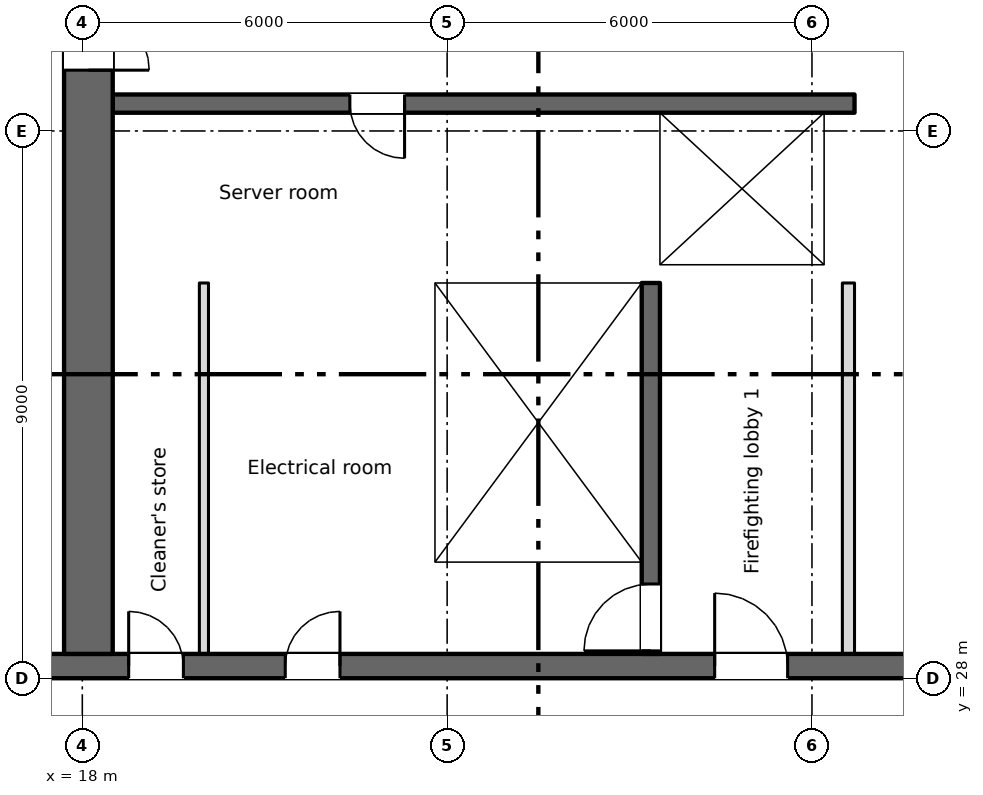
"""IFC4 building model, lengths in metres.
Left out: names, types, materials, properties, quantities, classifications, styles, units other than length and angle.
Written with IfcOpenShell. Run it as: python <this file> out.ifc"""

import sys

from ifc_helpers import new_model, si_unit, direction, frame, frame_2d, origin, place, context, subcontext, project, spatial, rectangle, extrude, element, fill, save


model = new_model("IFC4")
c1 = context("Model", 3, precision=1e-05, world=origin(), true_north=direction((0.0, 1.0)))
c2 = subcontext(c1, "Body", "Model", "MODEL_VIEW")
j1 = project(units=[si_unit("LENGTHUNIT", "METRE"), si_unit("PLANEANGLEUNIT", "RADIAN")], contexts=[c1])
p1 = place(None, origin())
s1 = spatial("IfcSite", under=j1, at=p1, CompositionType="ELEMENT")
p2 = place(p1, origin())
s2 = spatial("IfcBuilding", under=s1, at=p2, CompositionType="ELEMENT")
p3 = place(p2, frame((0.0, 0.0, 125.0)))
s3 = spatial("IfcBuildingStorey", under=s2, at=p3, CompositionType="ELEMENT", Elevation=125.0)
p4 = place(p3, frame((6.7, 28.2, 0.0), z_axis=(0.0, 0.0, 1.0), x_axis=(1.0, 0.0, 0.0)))
e1 = element("IfcWall", 1, at=p4, inside=s3, PredefinedType="SHEAR", context=c2, shape_type="SweptSolid", body=[
    extrude(rectangle(XDim=57.8, YDim=0.4, at=frame_2d((28.9, 0.0))), origin(), (0.0, 0.0, 1.0), 3.35),
])
p5 = place(p4, frame((12.062, 0.0, 0.0)))
e2 = element("IfcOpeningElement", 2, at=p5, cuts=e1, PredefinedType="OPENING", context=c2, shape_type="SweptSolid", body=[
    extrude(rectangle(XDim=0.9, YDim=2.1, at=frame_2d((0.45, 1.05))), frame((0.0, 0.21, 0.0), z_axis=(0.0, -1.0, 0.0), x_axis=(1.0, 0.0, 0.0)), (0.0, 0.0, 1.0), 0.42),
])
p6 = place(p4, frame((14.637, 0.0, 0.0)))
e3 = element("IfcOpeningElement", 3, at=p6, cuts=e1, PredefinedType="OPENING", context=c2, shape_type="SweptSolid", body=[
    extrude(rectangle(XDim=0.9, YDim=2.1, at=frame_2d((0.45, 1.05))), frame((0.0, 0.21, 0.0), z_axis=(0.0, -1.0, 0.0), x_axis=(1.0, 0.0, 0.0)), (0.0, 0.0, 1.0), 0.42),
])
p7 = place(p4, frame((49.062, 0.0, 0.0)))
e4 = element("IfcOpeningElement", 4, at=p7, cuts=e1, PredefinedType="OPENING", context=c2, shape_type="SweptSolid", body=[
    extrude(rectangle(XDim=0.9, YDim=2.1, at=frame_2d((0.45, 1.05))), frame((0.0, 0.21, 0.0), z_axis=(0.0, -1.0, 0.0), x_axis=(1.0, 0.0, 0.0)), (0.0, 0.0, 1.0), 0.42),
])
p8 = place(p4, frame((51.637, 0.0, 0.0)))
e5 = element("IfcOpeningElement", 5, at=p8, cuts=e1, PredefinedType="OPENING", context=c2, shape_type="SweptSolid", body=[
    extrude(rectangle(XDim=0.9, YDim=2.1, at=frame_2d((0.45, 1.05))), frame((0.0, 0.21, 0.0), z_axis=(0.0, -1.0, 0.0), x_axis=(1.0, 0.0, 0.0)), (0.0, 0.0, 1.0), 0.42),
])
p9 = place(p4, frame((1.35, 0.0, 0.0)))
e6 = element("IfcOpeningElement", 6, at=p9, cuts=e1, PredefinedType="OPENING", context=c2, shape_type="SweptSolid", body=[
    extrude(rectangle(XDim=0.9, YDim=2.1, at=frame_2d((0.45, 1.05))), frame((0.0, 0.21, 0.0), z_axis=(0.0, -1.0, 0.0), x_axis=(1.0, 0.0, 0.0)), (0.0, 0.0, 1.0), 0.42),
])
p10 = place(p4, frame((4.7, 0.0, 0.0)))
e7 = element("IfcOpeningElement", 7, at=p10, cuts=e1, PredefinedType="OPENING", context=c2, shape_type="SweptSolid", body=[
    extrude(rectangle(XDim=1.2, YDim=2.1, at=frame_2d((0.6, 1.05))), frame((0.0, 0.21, 0.0), z_axis=(0.0, -1.0, 0.0), x_axis=(1.0, 0.0, 0.0)), (0.0, 0.0, 1.0), 0.42),
])
p11 = place(p4, frame((31.7, 0.0, 0.0)))
e8 = element("IfcOpeningElement", 8, at=p11, cuts=e1, PredefinedType="OPENING", context=c2, shape_type="SweptSolid", body=[
    extrude(rectangle(XDim=1.2, YDim=2.1, at=frame_2d((0.6, 1.05))), frame((0.0, 0.21, 0.0), z_axis=(0.0, -1.0, 0.0), x_axis=(1.0, 0.0, 0.0)), (0.0, 0.0, 1.0), 0.42),
])
p12 = place(p4, frame((55.2, 0.0, 0.0)))
e9 = element("IfcOpeningElement", 9, at=p12, cuts=e1, PredefinedType="OPENING", context=c2, shape_type="SweptSolid", body=[
    extrude(rectangle(XDim=1.2, YDim=2.1, at=frame_2d((0.6, 1.05))), frame((0.0, 0.21, 0.0), z_axis=(0.0, -1.0, 0.0), x_axis=(1.0, 0.0, 0.0)), (0.0, 0.0, 1.0), 0.42),
])
p13 = place(p4, frame((21.7, 0.0, 0.0)))
e10 = element("IfcOpeningElement", 10, at=p13, cuts=e1, PredefinedType="OPENING", context=c2, shape_type="SweptSolid", body=[
    extrude(rectangle(XDim=1.2, YDim=2.1, at=frame_2d((0.6, 1.05))), frame((0.0, 0.21, 0.0), z_axis=(0.0, -1.0, 0.0), x_axis=(1.0, 0.0, 0.0)), (0.0, 0.0, 1.0), 0.42),
])
p14 = place(p4, frame((41.7, 0.0, 0.0)))
e11 = element("IfcOpeningElement", 11, at=p14, cuts=e1, PredefinedType="OPENING", context=c2, shape_type="SweptSolid", body=[
    extrude(rectangle(XDim=1.2, YDim=2.1, at=frame_2d((0.6, 1.05))), frame((0.0, 0.21, 0.0), z_axis=(0.0, -1.0, 0.0), x_axis=(1.0, 0.0, 0.0)), (0.0, 0.0, 1.0), 0.42),
])
p15 = place(p4, frame((24.85, 0.0, 0.0)))
e12 = element("IfcOpeningElement", 12, at=p15, cuts=e1, PredefinedType="OPENING", context=c2, shape_type="SweptSolid", body=[
    extrude(rectangle(XDim=2.4, YDim=2.1, at=frame_2d((1.2, 1.05))), frame((0.0, 0.21, 0.0), z_axis=(0.0, -1.0, 0.0), x_axis=(1.0, 0.0, 0.0)), (0.0, 0.0, 1.0), 0.42),
])
p16 = place(p4, frame((37.35, 0.0, 0.0)))
e13 = element("IfcOpeningElement", 13, at=p16, cuts=e1, PredefinedType="OPENING", context=c2, shape_type="SweptSolid", body=[
    extrude(rectangle(XDim=2.4, YDim=2.1, at=frame_2d((1.2, 1.05))), frame((0.0, 0.21, 0.0), z_axis=(0.0, -1.0, 0.0), x_axis=(1.0, 0.0, 0.0)), (0.0, 0.0, 1.0), 0.42),
])
p17 = place(p4, frame((7.95, 0.0, 0.0)))
e14 = element("IfcOpeningElement", 14, at=p17, cuts=e1, PredefinedType="OPENING", context=c2, shape_type="SweptSolid", body=[
    extrude(rectangle(XDim=2.4, YDim=2.1, at=frame_2d((1.2, 1.05))), frame((0.0, 0.21, 0.0), z_axis=(0.0, -1.0, 0.0), x_axis=(1.0, 0.0, 0.0)), (0.0, 0.0, 1.0), 0.42),
])
p18 = place(p4, frame((28.85, 0.0, 0.0)))
e15 = element("IfcOpeningElement", 15, at=p18, cuts=e1, PredefinedType="OPENING", context=c2, shape_type="SweptSolid", body=[
    extrude(rectangle(XDim=0.9, YDim=2.1, at=frame_2d((0.45, 1.05))), frame((0.0, 0.21, 0.0), z_axis=(0.0, -1.0, 0.0), x_axis=(1.0, 0.0, 0.0)), (0.0, 0.0, 1.0), 0.42),
])
p19 = place(p4, frame((34.85, 0.0, 0.0)))
e16 = element("IfcOpeningElement", 16, at=p19, cuts=e1, PredefinedType="OPENING", context=c2, shape_type="SweptSolid", body=[
    extrude(rectangle(XDim=0.9, YDim=2.1, at=frame_2d((0.45, 1.05))), frame((0.0, 0.21, 0.0), z_axis=(0.0, -1.0, 0.0), x_axis=(1.0, 0.0, 0.0)), (0.0, 0.0, 1.0), 0.42),
])
p20 = place(p3, frame((18.1, 28.4, 0.0), z_axis=(0.0, 0.0, 1.0), x_axis=(0.0, 1.0, 0.0)))
e17 = element("IfcWall", 17, at=p20, inside=s3, PredefinedType="SHEAR", context=c2, shape_type="SweptSolid", body=[
    extrude(rectangle(XDim=16.8, YDim=0.8, at=frame_2d((8.4, 0.0))), origin(), (0.0, 0.0, 1.0), 3.35),
])
p21 = place(p20, frame((9.6, 0.0, 0.0)))
e18 = element("IfcOpeningElement", 18, at=p21, cuts=e17, PredefinedType="OPENING", context=c2, shape_type="SweptSolid", body=[
    extrude(rectangle(XDim=2.0, YDim=2.1, at=frame_2d((1.0, 1.05))), frame((0.0, 0.41, 0.0), z_axis=(0.0, -1.0, 0.0), x_axis=(1.0, 0.0, 0.0)), (0.0, 0.0, 1.0), 0.82),
])
p22 = place(p20, frame((15.35, 0.0, 0.0)))
e19 = element("IfcOpeningElement", 19, at=p22, cuts=e17, PredefinedType="OPENING", context=c2, shape_type="SweptSolid", body=[
    extrude(rectangle(XDim=1.2, YDim=2.1, at=frame_2d((0.6, 1.05))), frame((0.0, 0.41, 0.0), z_axis=(0.0, -1.0, 0.0), x_axis=(1.0, 0.0, 0.0)), (0.0, 0.0, 1.0), 0.82),
])
p23 = place(p3, frame((23.65, 28.4, 0.0), z_axis=(0.0, 0.0, 1.0), x_axis=(0.0, 1.0, 0.0)))
e20 = element("IfcWall", 20, at=p23, inside=s3, PredefinedType="SHEAR", context=c2, shape_type="SweptSolid", body=[
    extrude(rectangle(XDim=6.1, YDim=0.3, at=frame_2d((3.05, 0.0))), origin(), (0.0, 0.0, 1.0), 3.35),
])
p24 = place(p3, frame((27.35, 28.4, 0.0), z_axis=(0.0, 0.0, 1.0), x_axis=(0.0, 1.0, 0.0)))
e21 = element("IfcWall", 21, at=p24, inside=s3, PredefinedType="SHEAR", context=c2, shape_type="SweptSolid", body=[
    extrude(rectangle(XDim=6.1, YDim=0.3, at=frame_2d((3.05, 0.0))), origin(), (0.0, 0.0, 1.0), 3.35),
])
p25 = place(p24, frame((0.05, 0.0, 0.0)))
e22 = element("IfcOpeningElement", 22, at=p25, cuts=e21, PredefinedType="OPENING", context=c2, shape_type="SweptSolid", body=[
    extrude(rectangle(XDim=1.1, YDim=2.1, at=frame_2d((0.55, 1.05))), frame((0.0, 0.16, 0.0), z_axis=(0.0, -1.0, 0.0), x_axis=(1.0, 0.0, 0.0)), (0.0, 0.0, 1.0), 0.32),
])
p26 = place(p3, frame((18.5, 34.65, 0.0), z_axis=(0.0, 0.0, 1.0), x_axis=(1.0, 0.0, 0.0)))
e23 = element("IfcWall", 23, at=p26, inside=s3, PredefinedType="SHEAR", context=c2, shape_type="SweptSolid", body=[
    extrude(rectangle(XDim=12.2, YDim=0.3, at=frame_2d((6.1, 0.0))), origin(), (0.0, 0.0, 1.0), 3.35),
])
p27 = place(p26, frame((9.8, 0.0, 0.0)))
e24 = element("IfcOpeningElement", 24, at=p27, cuts=e23, PredefinedType="OPENING", context=c2, shape_type="SweptSolid", body=[
    extrude(rectangle(XDim=1.1, YDim=2.1, at=frame_2d((0.55, 1.05))), frame((0.0, 0.16, 0.0), z_axis=(0.0, -1.0, 0.0), x_axis=(1.0, 0.0, 0.0)), (0.0, 0.0, 1.0), 0.32),
])
p28 = place(p3, frame((30.7, 37.45, 0.0), z_axis=(0.0, 0.0, 1.0), x_axis=(-1.0, 0.0, 0.0)))
e25 = element("IfcWall", 25, at=p28, inside=s3, PredefinedType="SHEAR", context=c2, shape_type="SweptSolid", body=[
    extrude(rectangle(XDim=12.2, YDim=0.3, at=frame_2d((6.1, 0.0))), origin(), (0.0, 0.0, 1.0), 3.35),
])
p29 = place(p28, frame((7.4, 0.0, 0.0)))
e26 = element("IfcOpeningElement", 26, at=p29, cuts=e25, PredefinedType="OPENING", context=c2, shape_type="SweptSolid", body=[
    extrude(rectangle(XDim=0.9, YDim=2.1, at=frame_2d((0.45, 1.05))), frame((0.0, 0.16, 0.0), z_axis=(0.0, -1.0, 0.0), x_axis=(1.0, 0.0, 0.0)), (0.0, 0.0, 1.0), 0.32),
])
p30 = place(p3, frame((27.35, 34.8, 0.0), z_axis=(0.0, 0.0, 1.0), x_axis=(0.0, 1.0, 0.0)))
e27 = element("IfcWall", 27, at=p30, inside=s3, PredefinedType="SHEAR", context=c2, shape_type="SweptSolid", body=[
    extrude(rectangle(XDim=2.5, YDim=0.3, at=frame_2d((1.25, 0.0))), origin(), (0.0, 0.0, 1.0), 3.35),
])
p31 = place(p3, frame((30.45, 34.8, 0.0), z_axis=(0.0, 0.0, 1.0), x_axis=(0.0, 1.0, 0.0)))
e28 = element("IfcWall", 28, at=p31, inside=s3, PredefinedType="SHEAR", context=c2, shape_type="SweptSolid", body=[
    extrude(rectangle(XDim=2.5, YDim=0.5, at=frame_2d((1.25, 0.0))), origin(), (0.0, 0.0, 1.0), 3.35),
])
p32 = place(p3, frame((30.6, 28.4, 0.0), z_axis=(0.0, 0.0, 1.0), x_axis=(0.0, 1.0, 0.0)))
e29 = element("IfcWall", 29, at=p32, inside=s3, PredefinedType="PARTITIONING", context=c2, shape_type="SweptSolid", body=[
    extrude(rectangle(XDim=6.1, YDim=0.2, at=frame_2d((3.05, 0.0))), origin(), (0.0, 0.0, 1.0), 3.35),
])
p33 = place(p3, frame((20.0, 28.4, 0.0), z_axis=(0.0, 0.0, 1.0), x_axis=(0.0, 1.0, 0.0)))
e30 = element("IfcWall", 30, at=p33, inside=s3, PredefinedType="PARTITIONING", context=c2, shape_type="SweptSolid", body=[
    extrude(rectangle(XDim=6.1, YDim=0.15, at=frame_2d((3.05, 0.0))), origin(), (0.0, 0.0, 1.0), 3.35),
])
p34 = place(p5, origin())
e31 = element("IfcDoor", 31, at=p34, inside=s3, OperationType="SINGLE_SWING_LEFT", PredefinedType="DOOR", context=c2, shape_type="SweptSolid", body=[
    extrude(rectangle(XDim=0.9, YDim=2.1, at=frame_2d((0.45, 1.05))), frame((0.0, 0.025, 0.0), z_axis=(0.0, -1.0, 0.0), x_axis=(1.0, 0.0, 0.0)), (0.0, 0.0, 1.0), 0.05),
])
fill(e2, e31)
p35 = place(p6, origin())
e32 = element("IfcDoor", 32, at=p35, inside=s3, OperationType="SINGLE_SWING_RIGHT", PredefinedType="DOOR", context=c2, shape_type="SweptSolid", body=[
    extrude(rectangle(XDim=0.9, YDim=2.1, at=frame_2d((0.45, 1.05))), frame((0.0, 0.025, 0.0), z_axis=(0.0, -1.0, 0.0), x_axis=(1.0, 0.0, 0.0)), (0.0, 0.0, 1.0), 0.05),
])
fill(e3, e32)
p36 = place(p29, origin())
e33 = element("IfcDoor", 33, at=p36, inside=s3, OperationType="SINGLE_SWING_LEFT", PredefinedType="DOOR", context=c2, shape_type="SweptSolid", body=[
    extrude(rectangle(XDim=0.9, YDim=2.1, at=frame_2d((0.45, 1.05))), frame((0.0, 0.025, 0.0), z_axis=(0.0, -1.0, 0.0), x_axis=(1.0, 0.0, 0.0)), (0.0, 0.0, 1.0), 0.05),
])
fill(e26, e33)
p37 = place(p27, origin())
e34 = element("IfcDoor", 34, at=p37, inside=s3, OperationType="SLIDING_TO_LEFT", PredefinedType="DOOR", context=c2, shape_type="SweptSolid", body=[
    extrude(rectangle(XDim=1.1, YDim=2.1, at=frame_2d((0.55, 1.05))), frame((0.0, 0.025, 0.0), z_axis=(0.0, -1.0, 0.0), x_axis=(1.0, 0.0, 0.0)), (0.0, 0.0, 1.0), 0.05),
])
fill(e24, e34)
p38 = place(p25, origin())
e35 = element("IfcDoor", 35, at=p38, inside=s3, OperationType="SINGLE_SWING_LEFT", PredefinedType="DOOR", context=c2, shape_type="SweptSolid", body=[
    extrude(rectangle(XDim=1.1, YDim=2.1, at=frame_2d((0.55, 1.05))), frame((0.0, 0.025, 0.0), z_axis=(0.0, -1.0, 0.0), x_axis=(1.0, 0.0, 0.0)), (0.0, 0.0, 1.0), 0.05),
])
fill(e22, e35)
p39 = place(p13, origin())
e36 = element("IfcDoor", 36, at=p39, inside=s3, OperationType="SINGLE_SWING_LEFT", PredefinedType="DOOR", context=c2, shape_type="SweptSolid", body=[
    extrude(rectangle(XDim=1.2, YDim=2.1, at=frame_2d((0.6, 1.05))), frame((0.0, 0.025, 0.0), z_axis=(0.0, -1.0, 0.0), x_axis=(1.0, 0.0, 0.0)), (0.0, 0.0, 1.0), 0.05),
])
fill(e10, e36)
p40 = place(p21, origin())
e37 = element("IfcDoor", 37, at=p40, inside=s3, OperationType="DOUBLE_DOOR_SINGLE_SWING", PredefinedType="DOOR", context=c2, shape_type="SweptSolid", body=[
    extrude(rectangle(XDim=2.0, YDim=2.1, at=frame_2d((1.0, 1.05))), frame((0.0, 0.025, 0.0), z_axis=(0.0, -1.0, 0.0), x_axis=(1.0, 0.0, 0.0)), (0.0, 0.0, 1.0), 0.05),
])
fill(e18, e37)
save(model, sys.argv[1])
